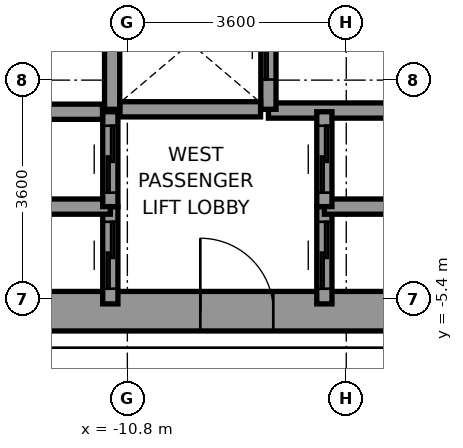
"""IFC4 building model, lengths in metres.
Left out: names, types, materials, properties, quantities, classifications, styles, units other than length and angle.
Written with IfcOpenShell. Run it as: python <this file> out.ifc"""

import sys

from ifc_helpers import new_model, si_unit, direction, frame, frame_2d, origin, place, context, subcontext, project, spatial, rectangle, extrude, source, transform, mapped, element, fill, save


model = new_model("IFC4")
c1 = context("Model", 3, precision=1e-05, world=origin(), true_north=direction((0.0, 1.0)))
c2 = subcontext(c1, "Body", "Model", "MODEL_VIEW")
j1 = project(units=[si_unit("LENGTHUNIT", "METRE"), si_unit("PLANEANGLEUNIT", "RADIAN")], contexts=[c1])
p1 = place(None, origin())
s1 = spatial("IfcSite", under=j1, at=p1, CompositionType="ELEMENT")
p2 = place(p1, origin())
s2 = spatial("IfcBuilding", under=s1, at=p2, CompositionType="ELEMENT")
p3 = place(p2, origin())
s3 = spatial("IfcBuildingStorey", under=s2, at=p3, CompositionType="ELEMENT", Elevation=0.0)
p4 = place(p3, frame((-13.2, -5.6, 0.0), z_axis=(0.0, 0.0, 1.0), x_axis=(1.0, 0.0, 0.0)))
e1 = element("IfcWall", 1, at=p4, inside=s3, PredefinedType="SHEAR", context=c2, shape_type="SweptSolid", body=[
    extrude(rectangle(XDim=7.8, YDim=0.65, at=frame_2d((3.9, 0.0))), origin(), (0.0, 0.0, 1.0), 5.15),
])
p5 = place(p4, frame((3.6, 0.0, 0.0)))
e2 = element("IfcOpeningElement", 2, at=p5, cuts=e1, PredefinedType="OPENING", context=c2, shape_type="SweptSolid", body=[
    extrude(rectangle(XDim=1.2, YDim=2.2, at=frame_2d((0.6, 1.1))), frame((0.0, 0.335, 0.0), z_axis=(0.0, -1.0, 0.0), x_axis=(1.0, 0.0, 0.0)), (0.0, 0.0, 1.0), 0.67),
])
p6 = place(p3, frame((-8.48, -2.3, 0.0), z_axis=(0.0, 0.0, 1.0), x_axis=(1.0, 0.0, 0.0)))
e3 = element("IfcWall", 3, at=p6, inside=s3, PredefinedType="SOLIDWALL", context=c2, shape_type="SweptSolid", body=[
    extrude(rectangle(XDim=3.08, YDim=0.25, at=frame_2d((1.54, 0.0))), origin(), (0.0, 0.0, 1.0), 5.15),
])
p7 = place(p3, frame((-11.05, -2.28, 0.0), z_axis=(0.0, 0.0, 1.0), x_axis=(0.0, 1.0, 0.0)))
e4 = element("IfcWall", 4, at=p7, inside=s3, PredefinedType="SOLIDWALL", context=c2, shape_type="SweptSolid", body=[
    extrude(rectangle(XDim=2.18, YDim=0.25, at=frame_2d((1.09, 0.0))), origin(), (0.0, 0.0, 1.0), 5.15),
])
p8 = place(p3, frame((-8.48, -2.28, 0.0), z_axis=(0.0, 0.0, 1.0), x_axis=(0.0, 1.0, 0.0)))
e5 = element("IfcWall", 5, at=p8, inside=s3, PredefinedType="SOLIDWALL", context=c2, shape_type="SweptSolid", body=[
    extrude(rectangle(XDim=2.18, YDim=0.25, at=frame_2d((1.09, 0.0))), origin(), (0.0, 0.0, 1.0), 5.15),
])
p9 = place(p8, frame((0.49, 0.0, 0.0)))
e6 = element("IfcOpeningElement", 6, at=p9, cuts=e5, PredefinedType="OPENING", context=c2, shape_type="SweptSolid", body=[
    extrude(rectangle(XDim=1.2, YDim=2.2, at=frame_2d((0.6, 1.1))), frame((0.0, 0.135, 0.0), z_axis=(0.0, -1.0, 0.0), x_axis=(1.0, 0.0, 0.0)), (0.0, 0.0, 1.0), 0.27),
])
p10 = place(p3, frame((-10.921, -2.28, 0.0), z_axis=(0.0, 0.0, 1.0), x_axis=(1.0, 0.0, 0.0)))
e7 = element("IfcWall", 7, at=p10, inside=s3, PredefinedType="SOLIDWALL", context=c2, shape_type="SweptSolid", body=[
    extrude(rectangle(XDim=2.312, YDim=0.25, at=frame_2d((1.156, 0.0))), origin(), (0.0, 0.0, 1.0), 5.15),
])
p11 = place(p3, frame((-11.08, -5.48, 0.0), z_axis=(0.0, 0.0, 1.0), x_axis=(0.0, 1.0, 0.0)))
e8 = element("IfcWall", 8, at=p11, inside=s3, PredefinedType="SOLIDWALL", context=c2, shape_type="SweptSolid", body=[
    extrude(rectangle(XDim=1.6, YDim=0.25, at=frame_2d((0.8, 0.0))), origin(), (0.0, 0.0, 1.0), 5.15),
])
p12 = place(p11, frame((0.25, 0.0, 0.0)))
e9 = element("IfcOpeningElement", 9, at=p12, cuts=e8, PredefinedType="OPENING", context=c2, shape_type="SweptSolid", body=[
    extrude(rectangle(XDim=1.1, YDim=2.2, at=frame_2d((0.55, 1.1))), frame((0.0, 0.135, 0.0), z_axis=(0.0, -1.0, 0.0), x_axis=(1.0, 0.0, 0.0)), (0.0, 0.0, 1.0), 0.27),
])
p13 = place(p3, frame((-12.92, -3.88, 0.0), z_axis=(0.0, 0.0, 1.0), x_axis=(1.0, 0.0, 0.0)))
e10 = element("IfcWall", 10, at=p13, inside=s3, PredefinedType="SOLIDWALL", context=c2, shape_type="SweptSolid", body=[
    extrude(rectangle(XDim=1.84, YDim=0.25, at=frame_2d((0.92, 0.0))), origin(), (0.0, 0.0, 1.0), 5.15),
])
p14 = place(p3, frame((-11.08, -3.88, 0.0), z_axis=(0.0, 0.0, 1.0), x_axis=(0.0, 1.0, 0.0)))
e11 = element("IfcWall", 11, at=p14, inside=s3, PredefinedType="SOLIDWALL", context=c2, shape_type="SweptSolid", body=[
    extrude(rectangle(XDim=1.56, YDim=0.25, at=frame_2d((0.78, 0.0))), origin(), (0.0, 0.0, 1.0), 5.15),
])
p15 = place(p14, frame((0.23, 0.0, 0.0)))
e12 = element("IfcOpeningElement", 12, at=p15, cuts=e11, PredefinedType="OPENING", context=c2, shape_type="SweptSolid", body=[
    extrude(rectangle(XDim=1.1, YDim=2.2, at=frame_2d((0.55, 1.1))), frame((0.0, 0.135, 0.0), z_axis=(0.0, -1.0, 0.0), x_axis=(1.0, 0.0, 0.0)), (0.0, 0.0, 1.0), 0.27),
])
p16 = place(p3, frame((-12.791, -2.32, 0.0), z_axis=(0.0, 0.0, 1.0), x_axis=(1.0, 0.0, 0.0)))
e13 = element("IfcWall", 13, at=p16, inside=s3, PredefinedType="SOLIDWALL", context=c2, shape_type="SweptSolid", body=[
    extrude(rectangle(XDim=1.582, YDim=0.25, at=frame_2d((0.791, 0.0))), origin(), (0.0, 0.0, 1.0), 5.15),
])
p17 = place(p3, frame((-7.56, -5.48, 0.0), z_axis=(0.0, 0.0, 1.0), x_axis=(0.0, 1.0, 0.0)))
e14 = element("IfcWall", 14, at=p17, inside=s3, PredefinedType="SOLIDWALL", context=c2, shape_type="SweptSolid", body=[
    extrude(rectangle(XDim=1.6, YDim=0.25, at=frame_2d((0.8, 0.0))), origin(), (0.0, 0.0, 1.0), 5.15),
])
p18 = place(p17, frame((0.25, 0.0, 0.0)))
e15 = element("IfcOpeningElement", 15, at=p18, cuts=e14, PredefinedType="OPENING", context=c2, shape_type="SweptSolid", body=[
    extrude(rectangle(XDim=1.1, YDim=2.2, at=frame_2d((0.55, 1.1))), frame((0.0, 0.135, 0.0), z_axis=(0.0, -1.0, 0.0), x_axis=(1.0, 0.0, 0.0)), (0.0, 0.0, 1.0), 0.27),
])
p19 = place(p3, frame((-7.56, -3.88, 0.0), z_axis=(0.0, 0.0, 1.0), x_axis=(1.0, 0.0, 0.0)))
e16 = element("IfcWall", 16, at=p19, inside=s3, PredefinedType="SOLIDWALL", context=c2, shape_type="SweptSolid", body=[
    extrude(rectangle(XDim=1.84, YDim=0.25, at=frame_2d((0.92, 0.0))), origin(), (0.0, 0.0, 1.0), 5.15),
])
p20 = place(p3, frame((-7.56, -3.88, 0.0), z_axis=(0.0, 0.0, 1.0), x_axis=(0.0, 1.0, 0.0)))
e17 = element("IfcWall", 17, at=p20, inside=s3, PredefinedType="SOLIDWALL", context=c2, shape_type="SweptSolid", body=[
    extrude(rectangle(XDim=1.56, YDim=0.25, at=frame_2d((0.78, 0.0))), origin(), (0.0, 0.0, 1.0), 5.15),
])
p21 = place(p20, frame((0.23, 0.0, 0.0)))
e18 = element("IfcOpeningElement", 18, at=p21, cuts=e17, PredefinedType="OPENING", context=c2, shape_type="SweptSolid", body=[
    extrude(rectangle(XDim=1.1, YDim=2.2, at=frame_2d((0.55, 1.1))), frame((0.0, 0.135, 0.0), z_axis=(0.0, -1.0, 0.0), x_axis=(1.0, 0.0, 0.0)), (0.0, 0.0, 1.0), 0.27),
])
m1 = source(origin(), c2, "Body", "SweptSolid", [
    extrude(rectangle(XDim=1.2, YDim=2.2, at=frame_2d((0.6, 1.1))), frame((0.0, 0.025, 0.0), z_axis=(0.0, -1.0, 0.0), x_axis=(1.0, 0.0, 0.0)), (0.0, 0.0, 1.0), 0.05),
])
p22 = place(p5, origin())
e19 = element("IfcDoor", 19, at=p22, inside=s3, OperationType="SINGLE_SWING_LEFT", PredefinedType="DOOR", context=c2, shape_type="MappedRepresentation", body=[
    mapped(m1, transform((0.0, 0.0, 0.0), x_axis=(1.0, 0.0, 0.0), y_axis=(0.0, 1.0, 0.0), z_axis=(0.0, 0.0, 1.0), scale=1.0)),
])
fill(e2, e19)
p23 = place(p9, origin())
e20 = element("IfcDoor", 20, at=p23, inside=s3, OperationType="SLIDING_TO_RIGHT", PredefinedType="DOOR", context=c2, shape_type="MappedRepresentation", body=[
    mapped(m1, transform((0.0, 0.0, 0.0), x_axis=(1.0, 0.0, 0.0), y_axis=(0.0, 1.0, 0.0), z_axis=(0.0, 0.0, 1.0), scale=1.0)),
])
fill(e6, e20)
m2 = source(origin(), c2, "Body", "SweptSolid", [
    extrude(rectangle(XDim=1.1, YDim=2.2, at=frame_2d((0.55, 1.1))), frame((0.0, 0.025, 0.0), z_axis=(0.0, -1.0, 0.0), x_axis=(1.0, 0.0, 0.0)), (0.0, 0.0, 1.0), 0.05),
])
p24 = place(p12, origin())
e21 = element("IfcDoor", 21, at=p24, inside=s3, OperationType="SLIDING_TO_LEFT", PredefinedType="DOOR", context=c2, shape_type="MappedRepresentation", body=[
    mapped(m2, transform((0.0, 0.0, 0.0), x_axis=(1.0, 0.0, 0.0), y_axis=(0.0, 1.0, 0.0), z_axis=(0.0, 0.0, 1.0), scale=1.0)),
])
fill(e9, e21)
p25 = place(p15, origin())
e22 = element("IfcDoor", 22, at=p25, inside=s3, OperationType="SLIDING_TO_LEFT", PredefinedType="DOOR", context=c2, shape_type="MappedRepresentation", body=[
    mapped(m2, transform((0.0, 0.0, 0.0), x_axis=(1.0, 0.0, 0.0), y_axis=(0.0, 1.0, 0.0), z_axis=(0.0, 0.0, 1.0), scale=1.0)),
])
fill(e12, e22)
p26 = place(p18, origin())
e23 = element("IfcDoor", 23, at=p26, inside=s3, OperationType="SLIDING_TO_LEFT", PredefinedType="DOOR", context=c2, shape_type="MappedRepresentation", body=[
    mapped(m2, transform((0.0, 0.0, 0.0), x_axis=(1.0, 0.0, 0.0), y_axis=(0.0, 1.0, 0.0), z_axis=(0.0, 0.0, 1.0), scale=1.0)),
])
fill(e15, e23)
p27 = place(p21, origin())
e24 = element("IfcDoor", 24, at=p27, inside=s3, OperationType="SLIDING_TO_LEFT", PredefinedType="DOOR", context=c2, shape_type="MappedRepresentation", body=[
    mapped(m2, transform((0.0, 0.0, 0.0), x_axis=(1.0, 0.0, 0.0), y_axis=(0.0, 1.0, 0.0), z_axis=(0.0, 0.0, 1.0), scale=1.0)),
])
fill(e18, e24)
save(model, sys.argv[1])
